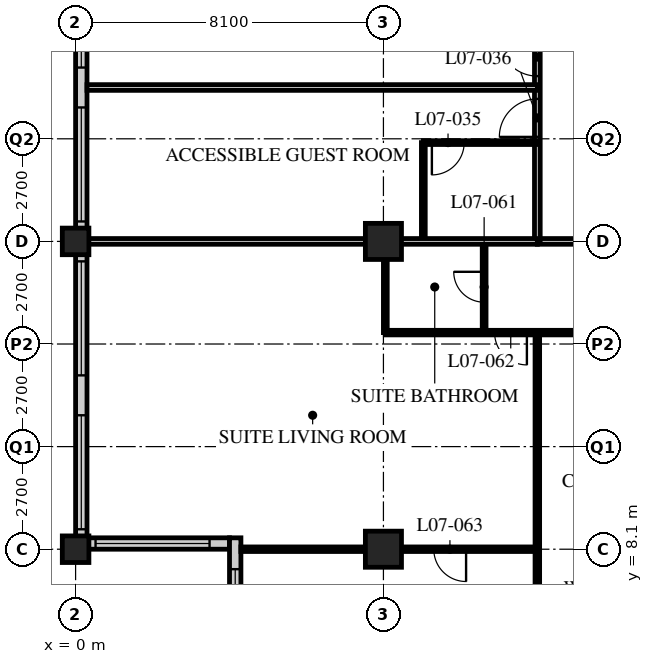
"""IFC4 building model, lengths in metres.
Left out: names, types, materials, properties, quantities, classifications, styles, units other than length and angle.
Written with IfcOpenShell. Run it as: python <this file> out.ifc"""

import sys

from ifc_helpers import new_model, si_unit, direction, frame, frame_2d, origin, origin_2d, place, context, subcontext, project, spatial, rectangle, hollow_rectangle, extrude, element, fill, save


model = new_model("IFC4")
c1 = context("Model", 3, precision=1e-05, world=origin(), true_north=direction((0.0, 1.0)))
c2 = subcontext(c1, "Body", "Model", "MODEL_VIEW")
j1 = project(units=[si_unit("LENGTHUNIT", "METRE"), si_unit("PLANEANGLEUNIT", "RADIAN")], contexts=[c1])
p1 = place(None, origin())
s1 = spatial("IfcSite", under=j1, at=p1, CompositionType="ELEMENT")
p2 = place(p1, origin())
s2 = spatial("IfcBuilding", under=s1, at=p2, CompositionType="ELEMENT")
p3 = place(p2, frame((0.0, 0.0, 36.4)))
s3 = spatial("IfcBuildingStorey", under=s2, at=p3, CompositionType="ELEMENT", Elevation=36.4)
for number, where, z_axis, x_axis in (
    (1, (0.0, 8.1, 0.0), (0.0, 0.0, 1.0), (1.0, 0.0, 0.0)),
    (2, (0.0, 16.2, 0.0), (0.0, 0.0, 1.0), (1.0, 0.0, 0.0)),
):
    element("IfcColumn", number, at=place(p3, frame(where, z_axis=z_axis, x_axis=x_axis)), inside=s3, PredefinedType="COLUMN", context=c2, shape_type="SweptSolid", body=[
        extrude(hollow_rectangle(XDim=0.7, YDim=0.7, WallThickness=0.06, at=origin_2d()), origin(), (0.0, 0.0, 1.0), 3.4),
    ])
for number, where, z_axis, x_axis in (
    (3, (8.1, 8.1, 0.0), (0.0, 0.0, 1.0), (1.0, 0.0, 0.0)),
    (4, (8.1, 16.2, 0.0), (0.0, 0.0, 1.0), (1.0, 0.0, 0.0)),
):
    element("IfcColumn", number, at=place(p3, frame(where, z_axis=z_axis, x_axis=x_axis)), inside=s3, PredefinedType="COLUMN", context=c2, shape_type="SweptSolid", body=[
        extrude(hollow_rectangle(XDim=0.95, YDim=0.95, WallThickness=0.095, at=origin_2d()), origin(), (0.0, 0.0, 1.0), 3.4),
    ])
p4 = place(p3, frame((0.15, 40.2, 0.0), z_axis=(0.0, 0.0, 1.0), x_axis=(0.0, -1.0, 0.0)))
e5 = element("IfcWall", 5, at=p4, inside=s3, PredefinedType="SOLIDWALL", context=c2, shape_type="SweptSolid", body=[
    extrude(rectangle(XDim=32.1, YDim=0.3, at=frame_2d((16.05, 0.0))), origin(), (0.0, 0.0, 1.0), 3.19),
])
p5 = place(p4, frame((0.225, 0.0, 0.9)))
e6 = element("IfcOpeningElement", 6, at=p5, cuts=e5, PredefinedType="OPENING", context=c2, shape_type="SweptSolid", body=[
    extrude(rectangle(XDim=3.0, YDim=2.0, at=frame_2d((1.5, 1.0))), frame((0.0, 0.16, 0.0), z_axis=(0.0, -1.0, 0.0), x_axis=(1.0, 0.0, 0.0)), (0.0, 0.0, 1.0), 0.32),
])
p6 = place(p4, frame((4.275, 0.0, 0.9)))
e7 = element("IfcOpeningElement", 7, at=p6, cuts=e5, PredefinedType="OPENING", context=c2, shape_type="SweptSolid", body=[
    extrude(rectangle(XDim=3.0, YDim=2.0, at=frame_2d((1.5, 1.0))), frame((0.0, 0.16, 0.0), z_axis=(0.0, -1.0, 0.0), x_axis=(1.0, 0.0, 0.0)), (0.0, 0.0, 1.0), 0.32),
])
p7 = place(p4, frame((8.325, 0.0, 0.9)))
e8 = element("IfcOpeningElement", 8, at=p7, cuts=e5, PredefinedType="OPENING", context=c2, shape_type="SweptSolid", body=[
    extrude(rectangle(XDim=3.0, YDim=2.0, at=frame_2d((1.5, 1.0))), frame((0.0, 0.16, 0.0), z_axis=(0.0, -1.0, 0.0), x_axis=(1.0, 0.0, 0.0)), (0.0, 0.0, 1.0), 0.32),
])
p8 = place(p4, frame((12.375, 0.0, 0.9)))
e9 = element("IfcOpeningElement", 9, at=p8, cuts=e5, PredefinedType="OPENING", context=c2, shape_type="SweptSolid", body=[
    extrude(rectangle(XDim=3.0, YDim=2.0, at=frame_2d((1.5, 1.0))), frame((0.0, 0.16, 0.0), z_axis=(0.0, -1.0, 0.0), x_axis=(1.0, 0.0, 0.0)), (0.0, 0.0, 1.0), 0.32),
])
p9 = place(p4, frame((16.425, 0.0, 0.9)))
e10 = element("IfcOpeningElement", 10, at=p9, cuts=e5, PredefinedType="OPENING", context=c2, shape_type="SweptSolid", body=[
    extrude(rectangle(XDim=3.0, YDim=2.0, at=frame_2d((1.5, 1.0))), frame((0.0, 0.16, 0.0), z_axis=(0.0, -1.0, 0.0), x_axis=(1.0, 0.0, 0.0)), (0.0, 0.0, 1.0), 0.32),
])
p10 = place(p4, frame((20.475, 0.0, 0.9)))
e11 = element("IfcOpeningElement", 11, at=p10, cuts=e5, PredefinedType="OPENING", context=c2, shape_type="SweptSolid", body=[
    extrude(rectangle(XDim=3.0, YDim=2.0, at=frame_2d((1.5, 1.0))), frame((0.0, 0.16, 0.0), z_axis=(0.0, -1.0, 0.0), x_axis=(1.0, 0.0, 0.0)), (0.0, 0.0, 1.0), 0.32),
])
p11 = place(p4, frame((24.525, 0.0, 0.9)))
e12 = element("IfcOpeningElement", 12, at=p11, cuts=e5, PredefinedType="OPENING", context=c2, shape_type="SweptSolid", body=[
    extrude(rectangle(XDim=3.0, YDim=2.0, at=frame_2d((1.5, 1.0))), frame((0.0, 0.16, 0.0), z_axis=(0.0, -1.0, 0.0), x_axis=(1.0, 0.0, 0.0)), (0.0, 0.0, 1.0), 0.32),
])
p12 = place(p4, frame((28.575, 0.0, 0.9)))
e13 = element("IfcOpeningElement", 13, at=p12, cuts=e5, PredefinedType="OPENING", context=c2, shape_type="SweptSolid", body=[
    extrude(rectangle(XDim=3.0, YDim=2.0, at=frame_2d((1.5, 1.0))), frame((0.0, 0.16, 0.0), z_axis=(0.0, -1.0, 0.0), x_axis=(1.0, 0.0, 0.0)), (0.0, 0.0, 1.0), 0.32),
])
p13 = place(p3, frame((0.3, 8.25, 0.0), z_axis=(0.0, 0.0, 1.0), x_axis=(1.0, 0.0, 0.0)))
e14 = element("IfcWall", 14, at=p13, inside=s3, PredefinedType="SOLIDWALL", context=c2, shape_type="SweptSolid", body=[
    extrude(rectangle(XDim=3.75, YDim=0.3, at=frame_2d((1.875, 0.0))), origin(), (0.0, 0.0, 1.0), 3.19),
])
p14 = place(p13, frame((0.225, 0.0, 0.9)))
e15 = element("IfcOpeningElement", 15, at=p14, cuts=e14, PredefinedType="OPENING", context=c2, shape_type="SweptSolid", body=[
    extrude(rectangle(XDim=3.0, YDim=1.5, at=frame_2d((1.5, 0.75))), frame((0.0, 0.16, 0.0), z_axis=(0.0, -1.0, 0.0), x_axis=(1.0, 0.0, 0.0)), (0.0, 0.0, 1.0), 0.32),
])
p15 = place(p3, frame((4.2, 8.4, 0.0), z_axis=(0.0, 0.0, 1.0), x_axis=(0.0, -1.0, 0.0)))
e16 = element("IfcWall", 16, at=p15, inside=s3, PredefinedType="SOLIDWALL", context=c2, shape_type="SweptSolid", body=[
    extrude(rectangle(XDim=4.35, YDim=0.3, at=frame_2d((2.175, 0.0))), origin(), (0.0, 0.0, 1.0), 3.19),
])
p16 = place(p15, frame((0.825, 0.0, 0.9)))
e17 = element("IfcOpeningElement", 17, at=p16, cuts=e16, PredefinedType="OPENING", context=c2, shape_type="SweptSolid", body=[
    extrude(rectangle(XDim=3.0, YDim=1.5, at=frame_2d((1.5, 0.75))), frame((0.0, 0.16, 0.0), z_axis=(0.0, -1.0, 0.0), x_axis=(1.0, 0.0, 0.0)), (0.0, 0.0, 1.0), 0.32),
])
p17 = place(p3, frame((12.15, 16.2, 0.0), z_axis=(0.0, 0.0, 1.0), x_axis=(1.0, 0.0, 0.0)))
e18 = element("IfcWall", 18, at=p17, inside=s3, PredefinedType="PARTITIONING", context=c2, shape_type="SweptSolid", body=[
    extrude(rectangle(XDim=32.4, YDim=0.15, at=frame_2d((16.2, 0.0))), origin(), (0.0, 0.0, 1.0), 2.578),
])
p18 = place(p17, frame((6.5, 0.0, 0.0)))
e19 = element("IfcOpeningElement", 19, at=p18, cuts=e18, PredefinedType="OPENING", context=c2, shape_type="SweptSolid", body=[
    extrude(rectangle(XDim=1.0, YDim=2.1, at=frame_2d((0.5, 1.05))), frame((0.0, 0.085, 0.0), z_axis=(0.0, -1.0, 0.0), x_axis=(1.0, 0.0, 0.0)), (0.0, 0.0, 1.0), 0.17),
])
p19 = place(p17, frame((8.4, 0.0, 0.0)))
e20 = element("IfcOpeningElement", 20, at=p19, cuts=e18, PredefinedType="OPENING", context=c2, shape_type="SweptSolid", body=[
    extrude(rectangle(XDim=1.0, YDim=2.1, at=frame_2d((0.5, 1.05))), frame((0.0, 0.085, 0.0), z_axis=(0.0, -1.0, 0.0), x_axis=(1.0, 0.0, 0.0)), (0.0, 0.0, 1.0), 0.17),
])
p20 = place(p17, frame((14.6, 0.0, 0.0)))
e21 = element("IfcOpeningElement", 21, at=p20, cuts=e18, PredefinedType="OPENING", context=c2, shape_type="SweptSolid", body=[
    extrude(rectangle(XDim=1.0, YDim=2.1, at=frame_2d((0.5, 1.05))), frame((0.0, 0.085, 0.0), z_axis=(0.0, -1.0, 0.0), x_axis=(1.0, 0.0, 0.0)), (0.0, 0.0, 1.0), 0.17),
])
p21 = place(p17, frame((16.5, 0.0, 0.0)))
e22 = element("IfcOpeningElement", 22, at=p21, cuts=e18, PredefinedType="OPENING", context=c2, shape_type="SweptSolid", body=[
    extrude(rectangle(XDim=1.0, YDim=2.1, at=frame_2d((0.5, 1.05))), frame((0.0, 0.085, 0.0), z_axis=(0.0, -1.0, 0.0), x_axis=(1.0, 0.0, 0.0)), (0.0, 0.0, 1.0), 0.17),
])
p22 = place(p17, frame((23.0, 0.0, 0.0)))
e23 = element("IfcOpeningElement", 23, at=p22, cuts=e18, PredefinedType="OPENING", context=c2, shape_type="SweptSolid", body=[
    extrude(rectangle(XDim=1.0, YDim=2.1, at=frame_2d((0.5, 1.05))), frame((0.0, 0.085, 0.0), z_axis=(0.0, -1.0, 0.0), x_axis=(1.0, 0.0, 0.0)), (0.0, 0.0, 1.0), 0.17),
])
p23 = place(p17, frame((24.6, 0.0, 0.0)))
e24 = element("IfcOpeningElement", 24, at=p23, cuts=e18, PredefinedType="OPENING", context=c2, shape_type="SweptSolid", body=[
    extrude(rectangle(XDim=1.0, YDim=2.1, at=frame_2d((0.5, 1.05))), frame((0.0, 0.085, 0.0), z_axis=(0.0, -1.0, 0.0), x_axis=(1.0, 0.0, 0.0)), (0.0, 0.0, 1.0), 0.17),
])
p24 = place(p17, frame((1.525, 0.0, 0.0)))
e25 = element("IfcOpeningElement", 25, at=p24, cuts=e18, PredefinedType="OPENING", context=c2, shape_type="SweptSolid", body=[
    extrude(rectangle(XDim=1.0, YDim=2.1, at=frame_2d((0.5, 1.05))), frame((0.0, 0.085, 0.0), z_axis=(0.0, -1.0, 0.0), x_axis=(1.0, 0.0, 0.0)), (0.0, 0.0, 1.0), 0.17),
])
p25 = place(p17, frame((29.875, 0.0, 0.0)))
e26 = element("IfcOpeningElement", 26, at=p25, cuts=e18, PredefinedType="OPENING", context=c2, shape_type="SweptSolid", body=[
    extrude(rectangle(XDim=1.0, YDim=2.1, at=frame_2d((0.5, 1.05))), frame((0.0, 0.085, 0.0), z_axis=(0.0, -1.0, 0.0), x_axis=(1.0, 0.0, 0.0)), (0.0, 0.0, 1.0), 0.17),
])
p26 = place(p3, frame((12.15, 16.2, 0.0), z_axis=(0.0, 0.0, 1.0), x_axis=(0.0, 1.0, 0.0)))
e27 = element("IfcWall", 27, at=p26, inside=s3, PredefinedType="PARTITIONING", context=c2, shape_type="SweptSolid", body=[
    extrude(rectangle(XDim=26.1, YDim=0.15, at=frame_2d((13.05, 0.0))), origin(), (0.0, 0.0, 1.0), 3.19),
])
p27 = place(p26, frame((2.75, 0.0, 0.0)))
e28 = element("IfcOpeningElement", 28, at=p27, cuts=e27, PredefinedType="OPENING", context=c2, shape_type="SweptSolid", body=[
    extrude(rectangle(XDim=1.0, YDim=2.1, at=frame_2d((0.5, 1.05))), frame((0.0, 0.085, 0.0), z_axis=(0.0, -1.0, 0.0), x_axis=(1.0, 0.0, 0.0)), (0.0, 0.0, 1.0), 0.17),
])
p28 = place(p26, frame((4.35, 0.0, 0.0)))
e29 = element("IfcOpeningElement", 29, at=p28, cuts=e27, PredefinedType="OPENING", context=c2, shape_type="SweptSolid", body=[
    extrude(rectangle(XDim=1.0, YDim=2.1, at=frame_2d((0.5, 1.05))), frame((0.0, 0.085, 0.0), z_axis=(0.0, -1.0, 0.0), x_axis=(1.0, 0.0, 0.0)), (0.0, 0.0, 1.0), 0.17),
])
p29 = place(p26, frame((10.55, 0.0, 0.0)))
e30 = element("IfcOpeningElement", 30, at=p29, cuts=e27, PredefinedType="OPENING", context=c2, shape_type="SweptSolid", body=[
    extrude(rectangle(XDim=1.0, YDim=2.1, at=frame_2d((0.5, 1.05))), frame((0.0, 0.085, 0.0), z_axis=(0.0, -1.0, 0.0), x_axis=(1.0, 0.0, 0.0)), (0.0, 0.0, 1.0), 0.17),
])
p30 = place(p26, frame((12.45, 0.0, 0.0)))
e31 = element("IfcOpeningElement", 31, at=p30, cuts=e27, PredefinedType="OPENING", context=c2, shape_type="SweptSolid", body=[
    extrude(rectangle(XDim=1.0, YDim=2.1, at=frame_2d((0.5, 1.05))), frame((0.0, 0.085, 0.0), z_axis=(0.0, -1.0, 0.0), x_axis=(1.0, 0.0, 0.0)), (0.0, 0.0, 1.0), 0.17),
])
p31 = place(p26, frame((18.65, 0.0, 0.0)))
e32 = element("IfcOpeningElement", 32, at=p31, cuts=e27, PredefinedType="OPENING", context=c2, shape_type="SweptSolid", body=[
    extrude(rectangle(XDim=1.0, YDim=2.1, at=frame_2d((0.5, 1.05))), frame((0.0, 0.085, 0.0), z_axis=(0.0, -1.0, 0.0), x_axis=(1.0, 0.0, 0.0)), (0.0, 0.0, 1.0), 0.17),
])
p32 = place(p26, frame((22.65, 0.0, 0.0)))
e33 = element("IfcOpeningElement", 33, at=p32, cuts=e27, PredefinedType="OPENING", context=c2, shape_type="SweptSolid", body=[
    extrude(rectangle(XDim=1.0, YDim=2.1, at=frame_2d((0.5, 1.05))), frame((0.0, 0.085, 0.0), z_axis=(0.0, -1.0, 0.0), x_axis=(1.0, 0.0, 0.0)), (0.0, 0.0, 1.0), 0.17),
])
p33 = place(p3, frame((9.15, 16.2, 0.0), z_axis=(0.0, 0.0, 1.0), x_axis=(0.0, 1.0, 0.0)))
e34 = element("IfcWall", 34, at=p33, inside=s3, PredefinedType="PARTITIONING", context=c2, shape_type="SweptSolid", body=[
    extrude(rectangle(XDim=2.6, YDim=0.1, at=frame_2d((1.3, 0.0))), origin(), (0.0, 0.0, 1.0), 3.19),
])
p34 = place(p3, frame((12.15, 18.8, 0.0), z_axis=(0.0, 0.0, 1.0), x_axis=(-1.0, 0.0, 0.0)))
e35 = element("IfcWall", 35, at=p34, inside=s3, PredefinedType="PARTITIONING", context=c2, shape_type="SweptSolid", body=[
    extrude(rectangle(XDim=3.0, YDim=0.1, at=frame_2d((1.5, 0.0))), origin(), (0.0, 0.0, 1.0), 3.19),
])
p35 = place(p34, frame((1.925, 0.0, 0.0)))
e36 = element("IfcOpeningElement", 36, at=p35, cuts=e35, PredefinedType="OPENING", context=c2, shape_type="SweptSolid", body=[
    extrude(rectangle(XDim=0.85, YDim=2.1, at=frame_2d((0.425, 1.05))), frame((0.0, 0.06, 0.0), z_axis=(0.0, -1.0, 0.0), x_axis=(1.0, 0.0, 0.0)), (0.0, 0.0, 1.0), 0.12),
])
p36 = place(p3, frame((12.15, 20.25, 0.0), z_axis=(0.0, 0.0, 1.0), x_axis=(-1.0, 0.0, 0.0)))
e37 = element("IfcWall", 37, at=p36, inside=s3, PredefinedType="PARTITIONING", context=c2, shape_type="SweptSolid", body=[
    extrude(rectangle(XDim=11.85, YDim=0.15, at=frame_2d((5.925, 0.0))), origin(), (0.0, 0.0, 1.0), 3.19),
])
p37 = place(p3, frame((10.75, 16.2, 0.0), z_axis=(0.0, 0.0, 1.0), x_axis=(0.0, -1.0, 0.0)))
e38 = element("IfcWall", 38, at=p37, inside=s3, PredefinedType="PARTITIONING", context=c2, shape_type="SweptSolid", body=[
    extrude(rectangle(XDim=2.4, YDim=0.1, at=frame_2d((1.2, 0.0))), origin(), (0.0, 0.0, 1.0), 3.19),
])
p38 = place(p37, frame((0.8, 0.0, 0.0)))
e39 = element("IfcOpeningElement", 39, at=p38, cuts=e38, PredefinedType="OPENING", context=c2, shape_type="SweptSolid", body=[
    extrude(rectangle(XDim=0.8, YDim=2.1, at=frame_2d((0.4, 1.05))), frame((0.0, 0.06, 0.0), z_axis=(0.0, -1.0, 0.0), x_axis=(1.0, 0.0, 0.0)), (0.0, 0.0, 1.0), 0.12),
])
p39 = place(p3, frame((8.15, 16.2, 0.0), z_axis=(0.0, 0.0, 1.0), x_axis=(0.0, -1.0, 0.0)))
e40 = element("IfcWall", 40, at=p39, inside=s3, PredefinedType="PARTITIONING", context=c2, shape_type="SweptSolid", body=[
    extrude(rectangle(XDim=2.4, YDim=0.1, at=frame_2d((1.2, 0.0))), origin(), (0.0, 0.0, 1.0), 2.578),
])
p40 = place(p3, frame((8.15, 13.8, 0.0), z_axis=(0.0, 0.0, 1.0), x_axis=(1.0, 0.0, 0.0)))
e41 = element("IfcWall", 41, at=p40, inside=s3, PredefinedType="PARTITIONING", context=c2, shape_type="SweptSolid", body=[
    extrude(rectangle(XDim=8.05, YDim=0.12, at=frame_2d((4.025, 0.0))), origin(), (0.0, 0.0, 1.0), 3.19),
])
p41 = place(p40, frame((6.725, 0.0, 0.0)))
e42 = element("IfcOpeningElement", 42, at=p41, cuts=e41, PredefinedType="OPENING", context=c2, shape_type="SweptSolid", body=[
    extrude(rectangle(XDim=0.85, YDim=2.1, at=frame_2d((0.425, 1.05))), frame((0.0, 0.07, 0.0), z_axis=(0.0, -1.0, 0.0), x_axis=(1.0, 0.0, 0.0)), (0.0, 0.0, 1.0), 0.14),
])
p42 = place(p40, frame((2.875, 0.0, 0.0)))
e43 = element("IfcOpeningElement", 43, at=p42, cuts=e41, PredefinedType="OPENING", context=c2, shape_type="SweptSolid", body=[
    extrude(rectangle(XDim=0.85, YDim=2.1, at=frame_2d((0.425, 1.05))), frame((0.0, 0.07, 0.0), z_axis=(0.0, -1.0, 0.0), x_axis=(1.0, 0.0, 0.0)), (0.0, 0.0, 1.0), 0.14),
])
p43 = place(p3, frame((12.15, 13.8, 0.0), z_axis=(0.0, 0.0, 1.0), x_axis=(0.0, -1.0, 0.0)))
e44 = element("IfcWall", 44, at=p43, inside=s3, PredefinedType="PARTITIONING", context=c2, shape_type="SweptSolid", body=[
    extrude(rectangle(XDim=13.5, YDim=0.12, at=frame_2d((6.75, 0.0))), origin(), (0.0, 0.0, 1.0), 3.19),
])
p44 = place(p3, frame((12.15, 8.1, 0.0), z_axis=(0.0, 0.0, 1.0), x_axis=(-1.0, 0.0, 0.0)))
e45 = element("IfcWall", 45, at=p44, inside=s3, PredefinedType="PARTITIONING", context=c2, shape_type="SweptSolid", body=[
    extrude(rectangle(XDim=7.8, YDim=0.12, at=frame_2d((3.9, 0.0))), origin(), (0.0, 0.0, 1.0), 2.578),
])
p45 = place(p44, frame((1.875, 0.0, 0.0)))
e46 = element("IfcOpeningElement", 46, at=p45, cuts=e45, PredefinedType="OPENING", context=c2, shape_type="SweptSolid", body=[
    extrude(rectangle(XDim=0.85, YDim=2.1, at=frame_2d((0.425, 1.05))), frame((0.0, 0.07, 0.0), z_axis=(0.0, -1.0, 0.0), x_axis=(1.0, 0.0, 0.0)), (0.0, 0.0, 1.0), 0.14),
])
p46 = place(p3, frame((0.3, 16.2, 0.0), z_axis=(0.0, 0.0, 1.0), x_axis=(1.0, 0.0, 0.0)))
e47 = element("IfcWall", 47, at=p46, inside=s3, PredefinedType="PARTITIONING", context=c2, shape_type="SweptSolid", body=[
    extrude(rectangle(XDim=11.85, YDim=0.15, at=frame_2d((5.925, 0.0))), origin(), (0.0, 0.0, 1.0), 2.578),
])
p47 = place(p9, origin())
e48 = element("IfcWindow", 48, at=p47, inside=s3, PartitioningType="SINGLE_PANEL", PredefinedType="WINDOW", context=c2, shape_type="SweptSolid", body=[
    extrude(rectangle(XDim=3.0, YDim=2.0, at=frame_2d((1.5, 1.0))), frame((0.0, 0.03, 0.0), z_axis=(0.0, -1.0, 0.0), x_axis=(1.0, 0.0, 0.0)), (0.0, 0.0, 1.0), 0.06),
])
fill(e10, e48)
p48 = place(p10, origin())
e49 = element("IfcWindow", 49, at=p48, inside=s3, PartitioningType="SINGLE_PANEL", PredefinedType="WINDOW", context=c2, shape_type="SweptSolid", body=[
    extrude(rectangle(XDim=3.0, YDim=2.0, at=frame_2d((1.5, 1.0))), frame((0.0, 0.03, 0.0), z_axis=(0.0, -1.0, 0.0), x_axis=(1.0, 0.0, 0.0)), (0.0, 0.0, 1.0), 0.06),
])
fill(e11, e49)
p49 = place(p11, origin())
e50 = element("IfcWindow", 50, at=p49, inside=s3, PartitioningType="SINGLE_PANEL", PredefinedType="WINDOW", context=c2, shape_type="SweptSolid", body=[
    extrude(rectangle(XDim=3.0, YDim=2.0, at=frame_2d((1.5, 1.0))), frame((0.0, 0.03, 0.0), z_axis=(0.0, -1.0, 0.0), x_axis=(1.0, 0.0, 0.0)), (0.0, 0.0, 1.0), 0.06),
])
fill(e12, e50)
p50 = place(p12, origin())
e51 = element("IfcWindow", 51, at=p50, inside=s3, PartitioningType="SINGLE_PANEL", PredefinedType="WINDOW", context=c2, shape_type="SweptSolid", body=[
    extrude(rectangle(XDim=3.0, YDim=2.0, at=frame_2d((1.5, 1.0))), frame((0.0, 0.03, 0.0), z_axis=(0.0, -1.0, 0.0), x_axis=(1.0, 0.0, 0.0)), (0.0, 0.0, 1.0), 0.06),
])
fill(e13, e51)
p51 = place(p14, origin())
e52 = element("IfcWindow", 52, at=p51, inside=s3, PartitioningType="SINGLE_PANEL", PredefinedType="WINDOW", context=c2, shape_type="SweptSolid", body=[
    extrude(rectangle(XDim=3.0, YDim=1.5, at=frame_2d((1.5, 0.75))), frame((0.0, 0.03, 0.0), z_axis=(0.0, -1.0, 0.0), x_axis=(1.0, 0.0, 0.0)), (0.0, 0.0, 1.0), 0.06),
])
fill(e15, e52)
p52 = place(p16, origin())
e53 = element("IfcWindow", 53, at=p52, inside=s3, PartitioningType="SINGLE_PANEL", PredefinedType="WINDOW", context=c2, shape_type="SweptSolid", body=[
    extrude(rectangle(XDim=3.0, YDim=1.5, at=frame_2d((1.5, 0.75))), frame((0.0, 0.03, 0.0), z_axis=(0.0, -1.0, 0.0), x_axis=(1.0, 0.0, 0.0)), (0.0, 0.0, 1.0), 0.06),
])
fill(e17, e53)
p53 = place(p35, origin())
e54 = element("IfcDoor", 54, at=p53, inside=s3, OperationType="SINGLE_SWING_RIGHT", PredefinedType="DOOR", context=c2, shape_type="SweptSolid", body=[
    extrude(rectangle(XDim=0.85, YDim=2.1, at=frame_2d((0.425, 1.05))), frame((0.0, 0.025, 0.0), z_axis=(0.0, -1.0, 0.0), x_axis=(1.0, 0.0, 0.0)), (0.0, 0.0, 1.0), 0.05),
])
fill(e36, e54)
p54 = place(p27, origin())
e55 = element("IfcDoor", 55, at=p54, inside=s3, OperationType="SINGLE_SWING_LEFT", PredefinedType="DOOR", context=c2, shape_type="SweptSolid", body=[
    extrude(rectangle(XDim=1.0, YDim=2.1, at=frame_2d((0.5, 1.05))), frame((0.0, 0.025, 0.0), z_axis=(0.0, -1.0, 0.0), x_axis=(1.0, 0.0, 0.0)), (0.0, 0.0, 1.0), 0.05),
])
fill(e28, e55)
p55 = place(p28, origin())
e56 = element("IfcDoor", 56, at=p55, inside=s3, OperationType="SINGLE_SWING_RIGHT", PredefinedType="DOOR", context=c2, shape_type="SweptSolid", body=[
    extrude(rectangle(XDim=1.0, YDim=2.1, at=frame_2d((0.5, 1.05))), frame((0.0, 0.025, 0.0), z_axis=(0.0, -1.0, 0.0), x_axis=(1.0, 0.0, 0.0)), (0.0, 0.0, 1.0), 0.05),
])
fill(e29, e56)
p56 = place(p38, origin())
e57 = element("IfcDoor", 57, at=p56, inside=s3, OperationType="SINGLE_SWING_RIGHT", PredefinedType="DOOR", context=c2, shape_type="SweptSolid", body=[
    extrude(rectangle(XDim=0.8, YDim=2.1, at=frame_2d((0.4, 1.05))), frame((0.0, 0.025, 0.0), z_axis=(0.0, -1.0, 0.0), x_axis=(1.0, 0.0, 0.0)), (0.0, 0.0, 1.0), 0.05),
])
fill(e39, e57)
p57 = place(p42, origin())
e58 = element("IfcDoor", 58, at=p57, inside=s3, OperationType="SINGLE_SWING_LEFT", PredefinedType="DOOR", context=c2, shape_type="SweptSolid", body=[
    extrude(rectangle(XDim=0.85, YDim=2.1, at=frame_2d((0.425, 1.05))), frame((0.0, 0.025, 0.0), z_axis=(0.0, -1.0, 0.0), x_axis=(1.0, 0.0, 0.0)), (0.0, 0.0, 1.0), 0.05),
])
fill(e43, e58)
p58 = place(p45, origin())
e59 = element("IfcDoor", 59, at=p58, inside=s3, OperationType="SINGLE_SWING_LEFT", PredefinedType="DOOR", context=c2, shape_type="SweptSolid", body=[
    extrude(rectangle(XDim=0.85, YDim=2.1, at=frame_2d((0.425, 1.05))), frame((0.0, 0.025, 0.0), z_axis=(0.0, -1.0, 0.0), x_axis=(1.0, 0.0, 0.0)), (0.0, 0.0, 1.0), 0.05),
])
fill(e46, e59)
save(model, sys.argv[1])
